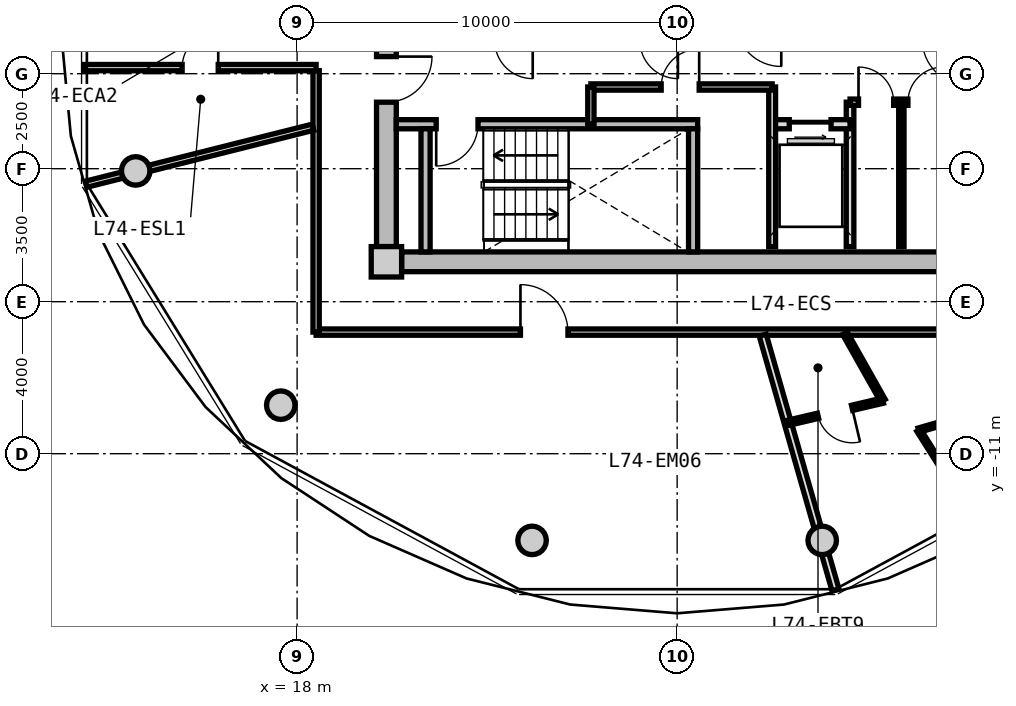
"""IFC4 building model, lengths in metres.
Left out: names, types, materials, properties, quantities, classifications, styles, units other than length and angle.
Written with IfcOpenShell. Run it as: python <this file> out.ifc"""

import sys

from ifc_helpers import new_model, si_unit, direction, frame, frame_2d, origin, origin_2d, place, context, subcontext, project, spatial, rectangle, circle, extrude, source, transform, mapped, element, fill, save


model = new_model("IFC4")
c1 = context("Model", 3, precision=1e-05, world=origin(), true_north=direction((0.0, 1.0)))
c2 = subcontext(c1, "Body", "Model", "MODEL_VIEW")
j1 = project(units=[si_unit("LENGTHUNIT", "METRE"), si_unit("PLANEANGLEUNIT", "RADIAN")], contexts=[c1])
p1 = place(None, origin())
s1 = spatial("IfcSite", under=j1, at=p1, CompositionType="ELEMENT")
p2 = place(p1, origin())
s2 = spatial("IfcBuilding", under=s1, at=p2, CompositionType="ELEMENT")
p3 = place(p2, frame((0.0, 0.0, 238.3)))
s3 = spatial("IfcBuildingStorey", under=s2, at=p3, CompositionType="ELEMENT", Elevation=238.3)
m1 = source(origin(), c2, "Body", "SweptSolid", [
    extrude(rectangle(XDim=0.8, YDim=0.8, at=origin_2d()), origin(), (0.0, 0.0, 1.0), 3.05),
])
p4 = place(p3, frame((20.35, -5.95, 0.0), z_axis=(0.0, 0.0, 1.0), x_axis=(1.0, 0.0, 0.0)))
e1 = element("IfcColumn", 1, at=p4, inside=s3, PredefinedType="COLUMN", context=c2, shape_type="MappedRepresentation", body=[
    mapped(m1, transform((0.0, 0.0, 0.0), x_axis=(1.0, 0.0, 0.0), y_axis=(0.0, 1.0, 0.0), z_axis=(0.0, 0.0, 1.0), scale=1.0)),
])
m2 = source(origin(), c2, "Body", "SweptSolid", [
    extrude(rectangle(XDim=14.5, YDim=0.52, at=frame_2d((7.25, 0.0))), origin(), (0.0, 0.0, 1.0), 2.81),
])
p5 = place(p3, frame((35.25, -5.95, 0.0), z_axis=(0.0, 0.0, 1.0), x_axis=(-1.0, 0.0, 0.0)))
e2 = element("IfcWall", 2, at=p5, inside=s3, PredefinedType="SHEAR", context=c2, shape_type="MappedRepresentation", body=[
    mapped(m2, transform((0.0, 0.0, 0.0), x_axis=(1.0, 0.0, 0.0), y_axis=(0.0, 1.0, 0.0), z_axis=(0.0, 0.0, 1.0), scale=1.0)),
])
m3 = source(origin(), c2, "Body", "SweptSolid", [
    extrude(rectangle(XDim=11.1, YDim=0.52, at=frame_2d((5.55, 0.0))), origin(), (0.0, 0.0, 1.0), 2.81),
])
p6 = place(p3, frame((20.35, -5.55, 0.0), z_axis=(0.0, 0.0, 1.0), x_axis=(0.0, 1.0, 0.0)))
e3 = element("IfcWall", 3, at=p6, inside=s3, PredefinedType="SHEAR", context=c2, shape_type="MappedRepresentation", body=[
    mapped(m3, transform((0.0, 0.0, 0.0), x_axis=(1.0, 0.0, 0.0), y_axis=(0.0, 1.0, 0.0), z_axis=(0.0, 0.0, 1.0), scale=1.0)),
])
p7 = place(p6, frame((3.8, 0.0, 0.0)))
e4 = element("IfcOpeningElement", 4, at=p7, cuts=e3, PredefinedType="OPENING", context=c2, shape_type="SweptSolid", body=[
    extrude(rectangle(XDim=1.2, YDim=2.15, at=frame_2d((0.6, 1.075))), frame((0.0, 0.27, 0.0), z_axis=(0.0, -1.0, 0.0), x_axis=(1.0, 0.0, 0.0)), (0.0, 0.0, 1.0), 0.54),
])
m4 = source(origin(), c2, "Body", "SweptSolid", [
    extrude(circle(Radius=0.375, at=origin_2d()), origin(), (0.0, 0.0, 1.0), 3.05),
])
for number, where, z_axis, x_axis in (
    (5, (13.753, -3.559, 0.0), (0.0, 0.0, 1.0), (1.0, 0.0, 0.0)),
    (6, (17.57, -9.723, 0.0), (0.0, 0.0, 1.0), (1.0, 0.0, 0.0)),
    (7, (24.182, -13.281, 0.0), (0.0, 0.0, 1.0), (1.0, 0.0, 0.0)),
    (8, (31.818, -13.281, 0.0), (0.0, 0.0, 1.0), (1.0, 0.0, 0.0)),
):
    element("IfcColumn", number, at=place(p3, frame(where, z_axis=z_axis, x_axis=x_axis)), inside=s3, PredefinedType="COLUMN", context=c2, shape_type="MappedRepresentation", body=[
        mapped(m4, transform((0.0, 0.0, 0.0), x_axis=(1.0, 0.0, 0.0), y_axis=(0.0, 1.0, 0.0), z_axis=(0.0, 0.0, 1.0), scale=1.0)),
    ])
m5 = source(origin(), c2, "Body", "SweptSolid", [
    extrude(rectangle(XDim=7.93, YDim=0.24, at=frame_2d((3.965, 0.0))), origin(), (0.0, 0.0, 1.0), 2.81),
])
p8 = place(p3, frame((20.61, -2.33, 0.0), z_axis=(0.0, 0.0, 1.0), x_axis=(1.0, 0.0, 0.0)))
e9 = element("IfcWall", 9, at=p8, inside=s3, PredefinedType="PARTITIONING", context=c2, shape_type="MappedRepresentation", body=[
    mapped(m5, transform((0.0, 0.0, 0.0), x_axis=(1.0, 0.0, 0.0), y_axis=(0.0, 1.0, 0.0), z_axis=(0.0, 0.0, 1.0), scale=1.0)),
])
p9 = place(p8, frame((1.05, 0.0, 0.0)))
e10 = element("IfcOpeningElement", 10, at=p9, cuts=e9, PredefinedType="OPENING", context=c2, shape_type="SweptSolid", body=[
    extrude(rectangle(XDim=1.1, YDim=2.15, at=frame_2d((0.55, 1.075))), frame((0.0, 0.13, 0.0), z_axis=(0.0, -1.0, 0.0), x_axis=(1.0, 0.0, 0.0)), (0.0, 0.0, 1.0), 0.26),
])
m6 = source(origin(), c2, "Body", "SweptSolid", [
    extrude(rectangle(XDim=3.24, YDim=0.24, at=frame_2d((1.62, 0.0))), origin(), (0.0, 0.0, 1.0), 2.81),
])
for number, where, z_axis, x_axis in (
    (11, (21.38, -5.69, 0.0), (0.0, 0.0, 1.0), (0.0, 1.0, 0.0)),
    (12, (28.42, -5.69, 0.0), (0.0, 0.0, 1.0), (0.0, 1.0, 0.0)),
):
    element("IfcWall", number, at=place(p3, frame(where, z_axis=z_axis, x_axis=x_axis)), inside=s3, PredefinedType="PARTITIONING", context=c2, shape_type="MappedRepresentation", body=[
        mapped(m6, transform((0.0, 0.0, 0.0), x_axis=(1.0, 0.0, 0.0), y_axis=(0.0, 1.0, 0.0), z_axis=(0.0, 0.0, 1.0), scale=1.0)),
    ])
m7 = source(origin(), c2, "Body", "SweptSolid", [
    extrude(rectangle(XDim=3.8, YDim=0.2, at=frame_2d((1.9, 0.0))), origin(), (0.0, 0.0, 1.0), 2.795),
])
p10 = place(p3, frame((32.55, -5.55, 0.0), z_axis=(0.0, 0.0, 1.0), x_axis=(0.0, 1.0, 0.0)))
e13 = element("IfcWall", 13, at=p10, inside=s3, PredefinedType="PARTITIONING", context=c2, shape_type="MappedRepresentation", body=[
    mapped(m7, transform((0.0, 0.0, 0.0), x_axis=(1.0, 0.0, 0.0), y_axis=(0.0, 1.0, 0.0), z_axis=(0.0, 0.0, 1.0), scale=1.0)),
])
m8 = source(origin(), c2, "Body", "SweptSolid", [
    extrude(rectangle(XDim=2.05, YDim=0.24, at=frame_2d((1.025, 0.0))), origin(), (0.0, 0.0, 1.0), 2.795),
])
p11 = place(p3, frame((30.5, -2.33, 0.0), z_axis=(0.0, 0.0, 1.0), x_axis=(1.0, 0.0, 0.0)))
e14 = element("IfcWall", 14, at=p11, inside=s3, PredefinedType="PARTITIONING", context=c2, shape_type="MappedRepresentation", body=[
    mapped(m8, transform((0.0, 0.0, 0.0), x_axis=(1.0, 0.0, 0.0), y_axis=(0.0, 1.0, 0.0), z_axis=(0.0, 0.0, 1.0), scale=1.0)),
])
p12 = place(p11, frame((0.45, 0.0, 0.0)))
e15 = element("IfcOpeningElement", 15, at=p12, cuts=e14, PredefinedType="OPENING", context=c2, shape_type="SweptSolid", body=[
    extrude(rectangle(XDim=1.1, YDim=2.2, at=frame_2d((0.55, 1.1))), frame((0.0, 0.13, 0.0), z_axis=(0.0, -1.0, 0.0), x_axis=(1.0, 0.0, 0.0)), (0.0, 0.0, 1.0), 0.26),
])
m9 = source(origin(), c2, "Body", "SweptSolid", [
    extrude(rectangle(XDim=4.2, YDim=0.18, at=frame_2d((2.1, 0.0))), origin(), (0.0, 0.0, 1.0), 2.795),
])
p13 = place(p3, frame((30.5, -5.55, 0.0), z_axis=(0.0, 0.0, 1.0), x_axis=(0.0, 1.0, 0.0)))
e16 = element("IfcWall", 16, at=p13, inside=s3, PredefinedType="PARTITIONING", context=c2, shape_type="MappedRepresentation", body=[
    mapped(m9, transform((0.0, 0.0, 0.0), x_axis=(1.0, 0.0, 0.0), y_axis=(0.0, 1.0, 0.0), z_axis=(0.0, 0.0, 1.0), scale=1.0)),
])
m10 = source(origin(), c2, "Body", "SweptSolid", [
    extrude(rectangle(XDim=4.77, YDim=0.165, at=frame_2d((2.385, 0.0))), origin(), (0.0, 0.0, 1.0), 2.795),
])
p14 = place(p3, frame((25.73, -1.35, 0.0), z_axis=(0.0, 0.0, 1.0), x_axis=(1.0, 0.0, 0.0)))
e17 = element("IfcWall", 17, at=p14, inside=s3, PredefinedType="PARTITIONING", context=c2, shape_type="MappedRepresentation", body=[
    mapped(m10, transform((0.0, 0.0, 0.0), x_axis=(1.0, 0.0, 0.0), y_axis=(0.0, 1.0, 0.0), z_axis=(0.0, 0.0, 1.0), scale=1.0)),
])
p15 = place(p14, frame((1.85, 0.0, 0.0)))
e18 = element("IfcOpeningElement", 18, at=p15, cuts=e17, PredefinedType="OPENING", context=c2, shape_type="SweptSolid", body=[
    extrude(rectangle(XDim=1.0, YDim=2.1, at=frame_2d((0.5, 1.05))), frame((0.0, 0.093, 0.0), z_axis=(0.0, -1.0, 0.0), x_axis=(1.0, 0.0, 0.0)), (0.0, 0.0, 1.0), 0.185),
])
m11 = source(origin(), c2, "Body", "SweptSolid", [
    extrude(rectangle(XDim=0.98, YDim=0.165, at=frame_2d((0.49, 0.0))), origin(), (0.0, 0.0, 1.0), 2.795),
])
p16 = place(p3, frame((25.73, -2.33, 0.0), z_axis=(0.0, 0.0, 1.0), x_axis=(0.0, 1.0, 0.0)))
e19 = element("IfcWall", 19, at=p16, inside=s3, PredefinedType="PARTITIONING", context=c2, shape_type="MappedRepresentation", body=[
    mapped(m11, transform((0.0, 0.0, 0.0), x_axis=(1.0, 0.0, 0.0), y_axis=(0.0, 1.0, 0.0), z_axis=(0.0, 0.0, 1.0), scale=1.0)),
])
m12 = source(origin(), c2, "Body", "SweptSolid", [
    extrude(rectangle(XDim=2.7, YDim=0.165, at=frame_2d((1.35, 0.0))), origin(), (0.0, 0.0, 1.0), 2.795),
])
p17 = place(p3, frame((32.55, -1.75, 0.0), z_axis=(0.0, 0.0, 1.0), x_axis=(1.0, 0.0, 0.0)))
e20 = element("IfcWall", 20, at=p17, inside=s3, PredefinedType="PARTITIONING", context=c2, shape_type="MappedRepresentation", body=[
    mapped(m12, transform((0.0, 0.0, 0.0), x_axis=(1.0, 0.0, 0.0), y_axis=(0.0, 1.0, 0.0), z_axis=(0.0, 0.0, 1.0), scale=1.0)),
])
p18 = place(p17, frame((0.222, 0.0, 0.0)))
e21 = element("IfcOpeningElement", 21, at=p18, cuts=e20, PredefinedType="OPENING", context=c2, shape_type="SweptSolid", body=[
    extrude(rectangle(XDim=0.925, YDim=2.1, at=frame_2d((0.462, 1.05))), frame((0.0, 0.093, 0.0), z_axis=(0.0, -1.0, 0.0), x_axis=(1.0, 0.0, 0.0)), (0.0, 0.0, 1.0), 0.185),
])
p19 = place(p17, frame((1.522, 0.0, 0.0)))
e22 = element("IfcOpeningElement", 22, at=p19, cuts=e20, PredefinedType="OPENING", context=c2, shape_type="SweptSolid", body=[
    extrude(rectangle(XDim=0.925, YDim=2.1, at=frame_2d((0.462, 1.05))), frame((0.0, 0.093, 0.0), z_axis=(0.0, -1.0, 0.0), x_axis=(1.0, 0.0, 0.0)), (0.0, 0.0, 1.0), 0.185),
])
m13 = source(origin(), c2, "Body", "SweptSolid", [
    extrude(rectangle(XDim=3.8, YDim=0.14, at=frame_2d((1.9, 0.0))), origin(), (0.0, 0.0, 1.0), 2.795),
])
p20 = place(p3, frame((33.9, -5.55, 0.0), z_axis=(0.0, 0.0, 1.0), x_axis=(0.0, 1.0, 0.0)))
e23 = element("IfcWall", 23, at=p20, inside=s3, PredefinedType="PARTITIONING", context=c2, shape_type="MappedRepresentation", body=[
    mapped(m13, transform((0.0, 0.0, 0.0), x_axis=(1.0, 0.0, 0.0), y_axis=(0.0, 1.0, 0.0), z_axis=(0.0, 0.0, 1.0), scale=1.0)),
])
m14 = source(origin(), c2, "Body", "SweptSolid", [
    extrude(rectangle(XDim=19.0, YDim=0.165, at=frame_2d((9.5, 0.0))), origin(), (0.0, 0.0, 1.0), 2.795),
])
p21 = place(p3, frame((37.5, -7.8, 0.0), z_axis=(0.0, 0.0, 1.0), x_axis=(-1.0, 0.0, 0.0)))
e24 = element("IfcWall", 24, at=p21, inside=s3, PredefinedType="PARTITIONING", context=c2, shape_type="MappedRepresentation", body=[
    mapped(m14, transform((0.0, 0.0, 0.0), x_axis=(1.0, 0.0, 0.0), y_axis=(0.0, 1.0, 0.0), z_axis=(0.0, 0.0, 1.0), scale=1.0)),
])
p22 = place(p21, frame((12.373, 0.0, 0.0)))
e25 = element("IfcOpeningElement", 25, at=p22, cuts=e24, PredefinedType="OPENING", context=c2, shape_type="SweptSolid", body=[
    extrude(rectangle(XDim=1.25, YDim=2.2, at=frame_2d((0.625, 1.1))), frame((0.0, 0.093, 0.0), z_axis=(0.0, -1.0, 0.0), x_axis=(1.0, 0.0, 0.0)), (0.0, 0.0, 1.0), 0.185),
])
m15 = source(origin(), c2, "Body", "SweptSolid", [
    extrude(rectangle(XDim=6.88, YDim=0.165, at=frame_2d((3.44, 0.0))), origin(), (0.0, 0.0, 1.0), 2.795),
])
p23 = place(p3, frame((18.5, -7.8, 0.0), z_axis=(0.0, 0.0, 1.0), x_axis=(0.0, 1.0, 0.0)))
e26 = element("IfcWall", 26, at=p23, inside=s3, PredefinedType="PARTITIONING", context=c2, shape_type="MappedRepresentation", body=[
    mapped(m15, transform((0.0, 0.0, 0.0), x_axis=(1.0, 0.0, 0.0), y_axis=(0.0, 1.0, 0.0), z_axis=(0.0, 0.0, 1.0), scale=1.0)),
])
m16 = source(origin(), c2, "Body", "SweptSolid", [
    extrude(rectangle(XDim=6.157, YDim=0.165, at=frame_2d((3.079, 0.0))), origin(), (0.0, 0.0, 1.0), 2.395),
])
p24 = place(p3, frame((18.42, -2.407, 0.0), z_axis=(0.0, 0.0, 1.0), x_axis=(-0.969840867184, -0.243738984038, 0.0)))
e27 = element("IfcWall", 27, at=p24, inside=s3, PredefinedType="PARTITIONING", context=c2, shape_type="MappedRepresentation", body=[
    mapped(m16, transform((0.0, 0.0, 0.0), x_axis=(1.0, 0.0, 0.0), y_axis=(0.0, 1.0, 0.0), z_axis=(0.0, 0.0, 1.0), scale=1.0)),
])
m17 = source(origin(), c2, "Body", "SweptSolid", [
    extrude(rectangle(XDim=6.101, YDim=0.165, at=frame_2d((3.051, 0.0))), origin(), (0.0, 0.0, 1.0), 2.795),
])
p25 = place(p3, frame((18.5, -0.84, 0.0), z_axis=(0.0, 0.0, 1.0), x_axis=(-1.0, 0.0, 0.0)))
e28 = element("IfcWall", 28, at=p25, inside=s3, PredefinedType="PARTITIONING", context=c2, shape_type="MappedRepresentation", body=[
    mapped(m17, transform((0.0, 0.0, 0.0), x_axis=(1.0, 0.0, 0.0), y_axis=(0.0, 1.0, 0.0), z_axis=(0.0, 0.0, 1.0), scale=1.0)),
])
p26 = place(p25, frame((2.576, 0.0, 0.0)))
e29 = element("IfcOpeningElement", 29, at=p26, cuts=e28, PredefinedType="OPENING", context=c2, shape_type="SweptSolid", body=[
    extrude(rectangle(XDim=0.95, YDim=2.1, at=frame_2d((0.475, 1.05))), frame((0.0, 0.093, 0.0), z_axis=(0.0, -1.0, 0.0), x_axis=(1.0, 0.0, 0.0)), (0.0, 0.0, 1.0), 0.185),
])
m18 = source(origin(), c2, "Body", "SweptSolid", [
    extrude(rectangle(XDim=6.974, YDim=0.19, at=frame_2d((3.487, 0.0))), origin(), (0.0, 0.0, 1.0), 2.395),
])
p27 = place(p3, frame((30.251, -7.88, 0.0), z_axis=(0.0, 0.0, 1.0), x_axis=(0.274707256801, -0.961527910703, 0.0)))
e30 = element("IfcWall", 30, at=p27, inside=s3, PredefinedType="PARTITIONING", context=c2, shape_type="MappedRepresentation", body=[
    mapped(m18, transform((0.0, 0.0, 0.0), x_axis=(1.0, 0.0, 0.0), y_axis=(0.0, 1.0, 0.0), z_axis=(0.0, 0.0, 1.0), scale=1.0)),
])
m19 = source(origin(), c2, "Body", "SweptSolid", [
    extrude(rectangle(XDim=2.035, YDim=0.14, at=frame_2d((1.018, 0.0))), origin(), (0.0, 0.0, 1.0), 2.795),
])
p28 = place(p3, frame((32.415, -7.83, 0.0), z_axis=(0.0, 0.0, 1.0), x_axis=(0.491092509169, -0.871107425888, 0.0)))
e31 = element("IfcWall", 31, at=p28, inside=s3, PredefinedType="PARTITIONING", context=c2, shape_type="MappedRepresentation", body=[
    mapped(m19, transform((0.0, 0.0, 0.0), x_axis=(1.0, 0.0, 0.0), y_axis=(0.0, 1.0, 0.0), z_axis=(0.0, 0.0, 1.0), scale=1.0)),
])
m20 = source(origin(), c2, "Body", "SweptSolid", [
    extrude(rectangle(XDim=2.586, YDim=0.14, at=frame_2d((1.293, 0.0))), origin(), (0.0, 0.0, 1.0), 2.795),
])
p29 = place(p3, frame((33.415, -9.603, 0.0), z_axis=(0.0, 0.0, 1.0), x_axis=(-0.973691298219, -0.227871138526, 0.0)))
e32 = element("IfcWall", 32, at=p29, inside=s3, PredefinedType="PARTITIONING", context=c2, shape_type="MappedRepresentation", body=[
    mapped(m20, transform((0.0, 0.0, 0.0), x_axis=(1.0, 0.0, 0.0), y_axis=(0.0, 1.0, 0.0), z_axis=(0.0, 0.0, 1.0), scale=1.0)),
])
p30 = place(p29, frame((0.833, 0.0, 0.0)))
e33 = element("IfcOpeningElement", 33, at=p30, cuts=e32, PredefinedType="OPENING", context=c2, shape_type="SweptSolid", body=[
    extrude(rectangle(XDim=0.92, YDim=2.1, at=frame_2d((0.46, 1.05))), frame((0.0, 0.08, 0.0), z_axis=(0.0, -1.0, 0.0), x_axis=(1.0, 0.0, 0.0)), (0.0, 0.0, 1.0), 0.16),
])
m21 = source(origin(), c2, "Body", "SweptSolid", [
    extrude(rectangle(XDim=2.662, YDim=0.115, at=frame_2d((1.331, 0.0))), origin(), (0.0, 0.0, 1.0), 2.795),
])
p31 = place(p3, frame((34.355, -10.38, 0.0), z_axis=(0.0, 0.0, 1.0), x_axis=(0.533547747092, -0.845769946009, 0.0)))
e34 = element("IfcWall", 34, at=p31, inside=s3, PredefinedType="PARTITIONING", context=c2, shape_type="MappedRepresentation", body=[
    mapped(m21, transform((0.0, 0.0, 0.0), x_axis=(1.0, 0.0, 0.0), y_axis=(0.0, 1.0, 0.0), z_axis=(0.0, 0.0, 1.0), scale=1.0)),
])
m22 = source(origin(), c2, "Body", "SweptSolid", [
    extrude(rectangle(XDim=3.702, YDim=0.115, at=frame_2d((1.851, 0.0))), origin(), (0.0, 0.0, 1.0), 2.795),
])
p32 = place(p3, frame((34.355, -10.38, 0.0), z_axis=(0.0, 0.0, 1.0), x_axis=(0.960044309887, 0.279848035645, 0.0)))
e35 = element("IfcWall", 35, at=p32, inside=s3, PredefinedType="PARTITIONING", context=c2, shape_type="MappedRepresentation", body=[
    mapped(m22, transform((0.0, 0.0, 0.0), x_axis=(1.0, 0.0, 0.0), y_axis=(0.0, 1.0, 0.0), z_axis=(0.0, 0.0, 1.0), scale=1.0)),
])
p33 = place(p32, frame((1.376, 0.0, 0.0)))
e36 = element("IfcOpeningElement", 36, at=p33, cuts=e35, PredefinedType="OPENING", context=c2, shape_type="SweptSolid", body=[
    extrude(rectangle(XDim=0.95, YDim=2.1, at=frame_2d((0.475, 1.05))), frame((0.0, 0.067, 0.0), z_axis=(0.0, -1.0, 0.0), x_axis=(1.0, 0.0, 0.0)), (0.0, 0.0, 1.0), 0.135),
])
m23 = source(origin(), c2, "Body", "SweptSolid", [
    extrude(rectangle(XDim=1.1, YDim=2.15, at=frame_2d((0.55, 1.075))), frame((0.0, 0.025, 0.0), z_axis=(0.0, -1.0, 0.0), x_axis=(1.0, 0.0, 0.0)), (0.0, 0.0, 1.0), 0.05),
])
p34 = place(p9, frame((1.1, 0.0, 0.0), z_axis=(0.0, 0.0, 1.0), x_axis=(-1.0, 0.0, 0.0)))
e37 = element("IfcDoor", 37, at=p34, inside=s3, OperationType="SINGLE_SWING_RIGHT", PredefinedType="DOOR", context=c2, shape_type="MappedRepresentation", body=[
    mapped(m23, transform((0.0, 0.0, 0.0), x_axis=(1.0, 0.0, 0.0), y_axis=(0.0, 1.0, 0.0), z_axis=(0.0, 0.0, 1.0), scale=1.0)),
])
fill(e10, e37)
m24 = source(origin(), c2, "Body", "SweptSolid", [
    extrude(rectangle(XDim=1.2, YDim=2.15, at=frame_2d((0.6, 1.075))), frame((0.0, 0.025, 0.0), z_axis=(0.0, -1.0, 0.0), x_axis=(1.0, 0.0, 0.0)), (0.0, 0.0, 1.0), 0.05),
])
p35 = place(p7, frame((1.2, 0.0, 0.0), z_axis=(0.0, 0.0, 1.0), x_axis=(-1.0, 0.0, 0.0)))
e38 = element("IfcDoor", 38, at=p35, inside=s3, OperationType="SINGLE_SWING_LEFT", PredefinedType="DOOR", context=c2, shape_type="MappedRepresentation", body=[
    mapped(m24, transform((0.0, 0.0, 0.0), x_axis=(1.0, 0.0, 0.0), y_axis=(0.0, 1.0, 0.0), z_axis=(0.0, 0.0, 1.0), scale=1.0)),
])
fill(e4, e38)
m25 = source(origin(), c2, "Body", "SweptSolid", [
    extrude(rectangle(XDim=1.1, YDim=2.2, at=frame_2d((0.55, 1.1))), frame((0.0, 0.025, 0.0), z_axis=(0.0, -1.0, 0.0), x_axis=(1.0, 0.0, 0.0)), (0.0, 0.0, 1.0), 0.05),
])
p36 = place(p12, frame((1.1, 0.0, 0.0), z_axis=(0.0, 0.0, 1.0), x_axis=(-1.0, 0.0, 0.0)))
e39 = element("IfcDoor", 39, at=p36, inside=s3, OperationType="SLIDING_TO_RIGHT", PredefinedType="DOOR", context=c2, shape_type="MappedRepresentation", body=[
    mapped(m25, transform((0.0, 0.0, 0.0), x_axis=(1.0, 0.0, 0.0), y_axis=(0.0, 1.0, 0.0), z_axis=(0.0, 0.0, 1.0), scale=1.0)),
])
fill(e15, e39)
m26 = source(origin(), c2, "Body", "SweptSolid", [
    extrude(rectangle(XDim=1.0, YDim=2.1, at=frame_2d((0.5, 1.05))), frame((0.0, 0.025, 0.0), z_axis=(0.0, -1.0, 0.0), x_axis=(1.0, 0.0, 0.0)), (0.0, 0.0, 1.0), 0.05),
])
p37 = place(p15, origin())
e40 = element("IfcDoor", 40, at=p37, inside=s3, OperationType="SINGLE_SWING_RIGHT", PredefinedType="DOOR", context=c2, shape_type="MappedRepresentation", body=[
    mapped(m26, transform((0.0, 0.0, 0.0), x_axis=(1.0, 0.0, 0.0), y_axis=(0.0, 1.0, 0.0), z_axis=(0.0, 0.0, 1.0), scale=1.0)),
])
fill(e18, e40)
m27 = source(origin(), c2, "Body", "SweptSolid", [
    extrude(rectangle(XDim=0.925, YDim=2.1, at=frame_2d((0.462, 1.05))), frame((0.0, 0.025, 0.0), z_axis=(0.0, -1.0, 0.0), x_axis=(1.0, 0.0, 0.0)), (0.0, 0.0, 1.0), 0.05),
])
p38 = place(p18, origin())
e41 = element("IfcDoor", 41, at=p38, inside=s3, OperationType="SINGLE_SWING_LEFT", PredefinedType="DOOR", context=c2, shape_type="MappedRepresentation", body=[
    mapped(m27, transform((0.0, 0.0, 0.0), x_axis=(1.0, 0.0, 0.0), y_axis=(0.0, 1.0, 0.0), z_axis=(0.0, 0.0, 1.0), scale=1.0)),
])
fill(e21, e41)
p39 = place(p19, origin())
e42 = element("IfcDoor", 42, at=p39, inside=s3, OperationType="SINGLE_SWING_RIGHT", PredefinedType="DOOR", context=c2, shape_type="MappedRepresentation", body=[
    mapped(m27, transform((0.0, 0.0, 0.0), x_axis=(1.0, 0.0, 0.0), y_axis=(0.0, 1.0, 0.0), z_axis=(0.0, 0.0, 1.0), scale=1.0)),
])
fill(e22, e42)
m28 = source(origin(), c2, "Body", "SweptSolid", [
    extrude(rectangle(XDim=0.95, YDim=2.1, at=frame_2d((0.475, 1.05))), frame((0.0, 0.025, 0.0), z_axis=(0.0, -1.0, 0.0), x_axis=(1.0, 0.0, 0.0)), (0.0, 0.0, 1.0), 0.05),
])
p40 = place(p26, frame((0.95, 0.0, 0.0), z_axis=(0.0, 0.0, 1.0), x_axis=(-1.0, 0.0, 0.0)))
e43 = element("IfcDoor", 43, at=p40, inside=s3, OperationType="SINGLE_SWING_RIGHT", PredefinedType="DOOR", context=c2, shape_type="MappedRepresentation", body=[
    mapped(m28, transform((0.0, 0.0, 0.0), x_axis=(1.0, 0.0, 0.0), y_axis=(0.0, 1.0, 0.0), z_axis=(0.0, 0.0, 1.0), scale=1.0)),
])
fill(e29, e43)
m29 = source(origin(), c2, "Body", "SweptSolid", [
    extrude(rectangle(XDim=1.25, YDim=2.2, at=frame_2d((0.625, 1.1))), frame((0.0, 0.025, 0.0), z_axis=(0.0, -1.0, 0.0), x_axis=(1.0, 0.0, 0.0)), (0.0, 0.0, 1.0), 0.05),
])
p41 = place(p22, frame((1.25, 0.0, 0.0), z_axis=(0.0, 0.0, 1.0), x_axis=(-1.0, 0.0, 0.0)))
e44 = element("IfcDoor", 44, at=p41, inside=s3, OperationType="SINGLE_SWING_LEFT", PredefinedType="DOOR", context=c2, shape_type="MappedRepresentation", body=[
    mapped(m29, transform((0.0, 0.0, 0.0), x_axis=(1.0, 0.0, 0.0), y_axis=(0.0, 1.0, 0.0), z_axis=(0.0, 0.0, 1.0), scale=1.0)),
])
fill(e25, e44)
m30 = source(origin(), c2, "Body", "SweptSolid", [
    extrude(rectangle(XDim=0.92, YDim=2.1, at=frame_2d((0.46, 1.05))), frame((0.0, 0.025, 0.0), z_axis=(0.0, -1.0, 0.0), x_axis=(1.0, 0.0, 0.0)), (0.0, 0.0, 1.0), 0.05),
])
p42 = place(p30, origin())
e45 = element("IfcDoor", 45, at=p42, inside=s3, OperationType="SINGLE_SWING_LEFT", PredefinedType="DOOR", context=c2, shape_type="MappedRepresentation", body=[
    mapped(m30, transform((0.0, 0.0, 0.0), x_axis=(1.0, 0.0, 0.0), y_axis=(0.0, 1.0, 0.0), z_axis=(0.0, 0.0, 1.0), scale=1.0)),
])
fill(e33, e45)
save(model, sys.argv[1])
